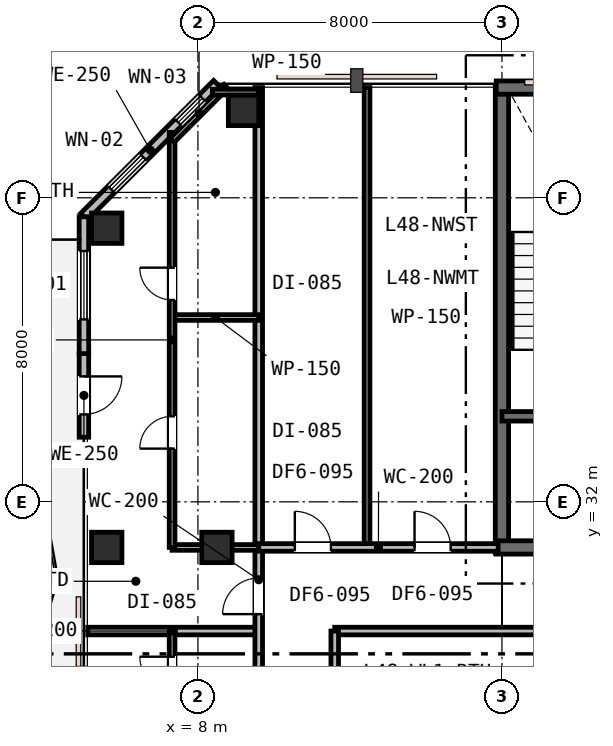
"""IFC4 building model, lengths in metres.
Left out: names, types, materials, properties, quantities, classifications, styles, units other than length and angle.
Written with IfcOpenShell. Run it as: python <this file> out.ifc"""

import sys

from ifc_helpers import new_model, si_unit, direction, frame, frame_2d, origin, origin_2d, place, context, subcontext, project, spatial, rectangle, extrude, element, fill, save


model = new_model("IFC4")
c1 = context("Model", 3, precision=1e-05, world=origin(), true_north=direction((0.0, 1.0)))
c2 = subcontext(c1, "Body", "Model", "MODEL_VIEW")
j1 = project(units=[si_unit("LENGTHUNIT", "METRE"), si_unit("PLANEANGLEUNIT", "RADIAN")], contexts=[c1])
p1 = place(None, origin())
s1 = spatial("IfcSite", under=j1, at=p1, CompositionType="ELEMENT")
p2 = place(p1, origin())
s2 = spatial("IfcBuilding", under=s1, at=p2, CompositionType="ELEMENT")
p3 = place(p2, frame((0.0, 0.0, 186.6)))
s3 = spatial("IfcBuildingStorey", under=s2, at=p3, CompositionType="ELEMENT", Elevation=186.6)
p4 = place(p3, frame((16.0, 30.65, 0.0), z_axis=(0.0, 0.0, 1.0), x_axis=(0.0, 1.0, 0.0)))
e1 = element("IfcWall", 1, at=p4, inside=s3, PredefinedType="SHEAR", context=c2, shape_type="SweptSolid", body=[
    extrude(rectangle(XDim=12.3, YDim=0.35, at=frame_2d((6.15, 0.0))), origin(), (0.0, 0.0, 1.0), 3.6),
])
p5 = place(p3, frame((15.85, 42.9, 0.0), z_axis=(0.0, 0.0, 1.0), x_axis=(1.0, 0.0, 0.0)))
e2 = element("IfcWall", 2, at=p5, inside=s3, PredefinedType="SHEAR", context=c2, shape_type="SweptSolid", body=[
    extrude(rectangle(XDim=24.3, YDim=0.35, at=frame_2d((12.15, 0.0))), origin(), (0.0, 0.0, 1.0), 3.6),
])
p6 = place(p3, frame((15.85, 30.8, 0.0), z_axis=(0.0, 0.0, 1.0), x_axis=(1.0, 0.0, 0.0)))
e3 = element("IfcWall", 3, at=p6, inside=s3, PredefinedType="SHEAR", context=c2, shape_type="SweptSolid", body=[
    extrude(rectangle(XDim=11.2, YDim=0.35, at=frame_2d((5.6, 0.0))), origin(), (0.0, 0.0, 1.0), 3.6),
])
p7 = place(p6, frame((2.45, 0.0, 0.0)))
e4 = element("IfcOpeningElement", 4, at=p7, cuts=e3, PredefinedType="OPENING", context=c2, shape_type="SweptSolid", body=[
    extrude(rectangle(XDim=1.1, YDim=2.15, at=frame_2d((0.55, 1.075))), frame((0.0, 0.185, 0.0), z_axis=(0.0, -1.0, 0.0), x_axis=(1.0, 0.0, 0.0)), (0.0, 0.0, 1.0), 0.37),
])
p8 = place(p3, frame((16.0, 34.25, 0.0), z_axis=(0.0, 0.0, 1.0), x_axis=(1.0, 0.0, 0.0)))
e5 = element("IfcWall", 5, at=p8, inside=s3, PredefinedType="SHEAR", context=c2, shape_type="SweptSolid", body=[
    extrude(rectangle(XDim=6.05, YDim=0.25, at=frame_2d((3.025, 0.0))), origin(), (0.0, 0.0, 1.0), 3.6),
])
p9 = place(p8, frame((1.25, 0.0, 0.0)))
e6 = element("IfcOpeningElement", 6, at=p9, cuts=e5, PredefinedType="OPENING", context=c2, shape_type="SweptSolid", body=[
    extrude(rectangle(XDim=1.0, YDim=2.15, at=frame_2d((0.5, 1.075))), frame((0.0, 0.135, 0.0), z_axis=(0.0, -1.0, 0.0), x_axis=(1.0, 0.0, 0.0)), (0.0, 0.0, 1.0), 0.27),
])
p10 = place(p8, frame((4.2, 0.0, 0.0)))
e7 = element("IfcOpeningElement", 7, at=p10, cuts=e5, PredefinedType="OPENING", context=c2, shape_type="SweptSolid", body=[
    extrude(rectangle(XDim=1.1, YDim=2.15, at=frame_2d((0.55, 1.075))), frame((0.0, 0.135, 0.0), z_axis=(0.0, -1.0, 0.0), x_axis=(1.0, 0.0, 0.0)), (0.0, 0.0, 1.0), 0.27),
])
for number, where, z_axis, x_axis in (
    (8, (5.6, 30.8, 0.0), (0.0, 0.0, 1.0), (1.0, 0.0, 0.0)),
    (9, (5.6, 39.2, 0.0), (0.0, 0.0, 1.0), (1.0, 0.0, 0.0)),
    (10, (8.5, 30.8, 0.0), (0.0, 0.0, 1.0), (1.0, 0.0, 0.0)),
    (11, (9.2, 42.3, 0.0), (0.0, 0.0, 1.0), (1.0, 0.0, 0.0)),
):
    element("IfcColumn", number, at=place(p3, frame(where, z_axis=z_axis, x_axis=x_axis)), inside=s3, PredefinedType="COLUMN", context=c2, shape_type="SweptSolid", body=[
        extrude(rectangle(XDim=0.8, YDim=0.8, at=origin_2d()), origin(), (0.0, 0.0, 1.0), 3.6),
    ])
p11 = place(p3, frame((8.5, 43.0, 0.0), z_axis=(0.0, 0.0, 1.0), x_axis=(-0.707106781187, -0.707106781187, 0.0)))
e12 = element("IfcWall", 12, at=p11, inside=s3, PredefinedType="STANDARD", context=c2, shape_type="SweptSolid", body=[
    extrude(rectangle(XDim=4.95, YDim=0.25, at=frame_2d((2.475, 0.0))), origin(), (0.0, 0.0, 1.0), 3.33),
])
p12 = place(p11, frame((0.54, 0.0, 0.9)))
e13 = element("IfcOpeningElement", 13, at=p12, cuts=e12, PredefinedType="OPENING", context=c2, shape_type="SweptSolid", body=[
    extrude(rectangle(XDim=0.9, YDim=1.55, at=frame_2d((0.45, 0.775))), frame((0.0, 0.135, 0.0), z_axis=(0.0, -1.0, 0.0), x_axis=(1.0, 0.0, 0.0)), (0.0, 0.0, 1.0), 0.27),
])
p13 = place(p11, frame((2.735, 0.0, 0.85)))
e14 = element("IfcOpeningElement", 14, at=p13, cuts=e12, PredefinedType="OPENING", context=c2, shape_type="SweptSolid", body=[
    extrude(rectangle(XDim=1.2, YDim=1.6, at=frame_2d((0.6, 0.8))), frame((0.0, 0.135, 0.0), z_axis=(0.0, -1.0, 0.0), x_axis=(1.0, 0.0, 0.0)), (0.0, 0.0, 1.0), 0.27),
])
p14 = place(p3, frame((5.0, 35.9, 0.0), z_axis=(0.0, 0.0, 1.0), x_axis=(0.0, -1.0, 0.0)))
e15 = element("IfcWall", 15, at=p14, inside=s3, PredefinedType="STANDARD", context=c2, shape_type="SweptSolid", body=[
    extrude(rectangle(XDim=2.2, YDim=0.25, at=frame_2d((1.1, 0.0))), origin(), (0.0, 0.0, 1.0), 3.33),
])
p15 = place(p14, frame((0.6, 0.0, 0.0)))
e16 = element("IfcOpeningElement", 16, at=p15, cuts=e15, PredefinedType="OPENING", context=c2, shape_type="SweptSolid", body=[
    extrude(rectangle(XDim=1.0, YDim=2.15, at=frame_2d((0.5, 1.075))), frame((0.0, 0.135, 0.0), z_axis=(0.0, -1.0, 0.0), x_axis=(1.0, 0.0, 0.0)), (0.0, 0.0, 1.0), 0.27),
])
p16 = place(p3, frame((5.0, 39.5, 0.0), z_axis=(0.0, 0.0, 1.0), x_axis=(0.0, -1.0, 0.0)))
e17 = element("IfcWall", 17, at=p16, inside=s3, PredefinedType="STANDARD", context=c2, shape_type="SweptSolid", body=[
    extrude(rectangle(XDim=3.6, YDim=0.25, at=frame_2d((1.8, 0.0))), origin(), (0.0, 0.0, 1.0), 3.33),
])
p17 = place(p16, frame((0.9, 0.0, 0.75)))
e18 = element("IfcOpeningElement", 18, at=p17, cuts=e17, PredefinedType="OPENING", context=c2, shape_type="SweptSolid", body=[
    extrude(rectangle(XDim=1.8, YDim=1.85, at=frame_2d((0.9, 0.925))), frame((0.0, 0.135, 0.0), z_axis=(0.0, -1.0, 0.0), x_axis=(1.0, 0.0, 0.0)), (0.0, 0.0, 1.0), 0.27),
])
p18 = place(p3, frame((5.1, 28.6, 0.0), z_axis=(0.0, 0.0, 1.0), x_axis=(1.0, 0.0, 0.0)))
e19 = element("IfcWall", 19, at=p18, inside=s3, PredefinedType="PARTITIONING", context=c2, shape_type="SweptSolid", body=[
    extrude(rectangle(XDim=4.5, YDim=0.2, at=frame_2d((2.25, 0.0))), origin(), (0.0, 0.0, 1.0), 2.92),
])
p19 = place(p3, frame((11.6, 28.6, 0.0), z_axis=(0.0, 0.0, 1.0), x_axis=(1.0, 0.0, 0.0)))
e20 = element("IfcWall", 20, at=p19, inside=s3, PredefinedType="PARTITIONING", context=c2, shape_type="SweptSolid", body=[
    extrude(rectangle(XDim=39.3, YDim=0.2, at=frame_2d((19.65, 0.0))), origin(), (0.0, 0.0, 1.0), 2.92),
])
p20 = place(p19, frame((15.825, 0.0, 0.0)))
e21 = element("IfcOpeningElement", 21, at=p20, cuts=e20, PredefinedType="OPENING", context=c2, shape_type="SweptSolid", body=[
    extrude(rectangle(XDim=0.95, YDim=2.15, at=frame_2d((0.475, 1.075))), frame((0.0, 0.11, 0.0), z_axis=(0.0, -1.0, 0.0), x_axis=(1.0, 0.0, 0.0)), (0.0, 0.0, 1.0), 0.22),
])
p21 = place(p19, frame((29.275, 0.0, 0.0)))
e22 = element("IfcOpeningElement", 22, at=p21, cuts=e20, PredefinedType="OPENING", context=c2, shape_type="SweptSolid", body=[
    extrude(rectangle(XDim=0.95, YDim=2.15, at=frame_2d((0.475, 1.075))), frame((0.0, 0.11, 0.0), z_axis=(0.0, -1.0, 0.0), x_axis=(1.0, 0.0, 0.0)), (0.0, 0.0, 1.0), 0.22),
])
p22 = place(p3, frame((9.6, 17.0, 0.0), z_axis=(0.0, 0.0, 1.0), x_axis=(0.0, 1.0, 0.0)))
e23 = element("IfcWall", 23, at=p22, inside=s3, PredefinedType="PARTITIONING", context=c2, shape_type="SweptSolid", body=[
    extrude(rectangle(XDim=25.9, YDim=0.2, at=frame_2d((12.95, 0.0))), origin(), (0.0, 0.0, 1.0), 2.92),
])
p23 = place(p22, frame((12.045, 0.0, 0.0)))
e24 = element("IfcOpeningElement", 24, at=p23, cuts=e23, PredefinedType="OPENING", context=c2, shape_type="SweptSolid", body=[
    extrude(rectangle(XDim=0.95, YDim=2.15, at=frame_2d((0.475, 1.075))), frame((0.0, 0.11, 0.0), z_axis=(0.0, -1.0, 0.0), x_axis=(1.0, 0.0, 0.0)), (0.0, 0.0, 1.0), 0.22),
])
p24 = place(p22, frame((3.125, 0.0, 0.0)))
e25 = element("IfcOpeningElement", 25, at=p24, cuts=e23, PredefinedType="OPENING", context=c2, shape_type="SweptSolid", body=[
    extrude(rectangle(XDim=0.95, YDim=2.15, at=frame_2d((0.475, 1.075))), frame((0.0, 0.11, 0.0), z_axis=(0.0, -1.0, 0.0), x_axis=(1.0, 0.0, 0.0)), (0.0, 0.0, 1.0), 0.22),
])
p25 = place(p3, frame((7.32, 30.8, 0.0), z_axis=(0.0, 0.0, 1.0), x_axis=(1.0, 0.0, 0.0)))
e26 = element("IfcWall", 26, at=p25, inside=s3, PredefinedType="PARTITIONING", context=c2, shape_type="SweptSolid", body=[
    extrude(rectangle(XDim=2.28, YDim=0.15, at=frame_2d((1.14, 0.0))), origin(), (0.0, 0.0, 1.0), 2.92),
])
p26 = place(p3, frame((7.32, 36.85, 0.0), z_axis=(0.0, 0.0, 1.0), x_axis=(1.0, 0.0, 0.0)))
e27 = element("IfcWall", 27, at=p26, inside=s3, PredefinedType="PARTITIONING", context=c2, shape_type="SweptSolid", body=[
    extrude(rectangle(XDim=2.28, YDim=0.15, at=frame_2d((1.14, 0.0))), origin(), (0.0, 0.0, 1.0), 3.33),
])
p27 = place(p3, frame((7.32, 30.8, 0.0), z_axis=(0.0, 0.0, 1.0), x_axis=(0.0, 1.0, 0.0)))
e28 = element("IfcWall", 28, at=p27, inside=s3, PredefinedType="PARTITIONING", context=c2, shape_type="SweptSolid", body=[
    extrude(rectangle(XDim=10.92, YDim=0.15, at=frame_2d((5.46, 0.0))), origin(), (0.0, 0.0, 1.0), 2.92),
])
p28 = place(p27, frame((2.6, 0.0, 0.0)))
e29 = element("IfcOpeningElement", 29, at=p28, cuts=e28, PredefinedType="OPENING", context=c2, shape_type="SweptSolid", body=[
    extrude(rectangle(XDim=0.85, YDim=2.15, at=frame_2d((0.425, 1.075))), frame((0.0, 0.085, 0.0), z_axis=(0.0, -1.0, 0.0), x_axis=(1.0, 0.0, 0.0)), (0.0, 0.0, 1.0), 0.17),
])
p29 = place(p27, frame((6.512, 0.0, 0.0)))
e30 = element("IfcOpeningElement", 30, at=p29, cuts=e28, PredefinedType="OPENING", context=c2, shape_type="SweptSolid", body=[
    extrude(rectangle(XDim=0.85, YDim=2.15, at=frame_2d((0.425, 1.075))), frame((0.0, 0.085, 0.0), z_axis=(0.0, -1.0, 0.0), x_axis=(1.0, 0.0, 0.0)), (0.0, 0.0, 1.0), 0.17),
])
p30 = place(p3, frame((7.32, 41.509, 0.0), z_axis=(0.0, 0.0, 1.0), x_axis=(0.707106781187, 0.707106781187, 0.0)))
e31 = element("IfcWall", 31, at=p30, inside=s3, PredefinedType="PARTITIONING", context=c2, shape_type="SweptSolid", body=[
    extrude(rectangle(XDim=2.009, YDim=0.15, at=frame_2d((1.004, 0.0))), origin(), (0.0, 0.0, 1.0), 3.33),
])
p31 = place(p3, frame((8.38, 42.78, 0.0), z_axis=(0.0, 0.0, 1.0), x_axis=(1.0, 0.0, 0.0)))
e32 = element("IfcWall", 32, at=p31, inside=s3, PredefinedType="PARTITIONING", context=c2, shape_type="SweptSolid", body=[
    extrude(rectangle(XDim=1.22, YDim=0.15, at=frame_2d((0.61, 0.0))), origin(), (0.0, 0.0, 1.0), 3.02),
])
p32 = place(p3, frame((12.45, 30.8, 0.0), z_axis=(0.0, 0.0, 1.0), x_axis=(0.0, 1.0, 0.0)))
e33 = element("IfcWall", 33, at=p32, inside=s3, PredefinedType="PARTITIONING", context=c2, shape_type="SweptSolid", body=[
    extrude(rectangle(XDim=12.1, YDim=0.15, at=frame_2d((6.05, 0.0))), origin(), (0.0, 0.0, 1.0), 2.92),
])
p33 = place(p3, frame((9.6, 30.8, 0.0), z_axis=(0.0, 0.0, 1.0), x_axis=(1.0, 0.0, 0.0)))
e34 = element("IfcWall", 34, at=p33, inside=s3, PredefinedType="PARTITIONING", context=c2, shape_type="SweptSolid", body=[
    extrude(rectangle(XDim=6.3, YDim=0.2, at=frame_2d((3.15, 0.0))), origin(), (0.0, 0.0, 1.0), 2.92),
])
p34 = place(p33, frame((0.95, 0.0, 0.0)))
e35 = element("IfcOpeningElement", 35, at=p34, cuts=e34, PredefinedType="OPENING", context=c2, shape_type="SweptSolid", body=[
    extrude(rectangle(XDim=0.95, YDim=2.15, at=frame_2d((0.475, 1.075))), frame((0.0, 0.11, 0.0), z_axis=(0.0, -1.0, 0.0), x_axis=(1.0, 0.0, 0.0)), (0.0, 0.0, 1.0), 0.22),
])
p35 = place(p33, frame((4.1, 0.0, 0.0)))
e36 = element("IfcOpeningElement", 36, at=p35, cuts=e34, PredefinedType="OPENING", context=c2, shape_type="SweptSolid", body=[
    extrude(rectangle(XDim=0.95, YDim=2.15, at=frame_2d((0.475, 1.075))), frame((0.0, 0.11, 0.0), z_axis=(0.0, -1.0, 0.0), x_axis=(1.0, 0.0, 0.0)), (0.0, 0.0, 1.0), 0.22),
])
p36 = place(p3, frame((7.32, 24.2, 0.0), z_axis=(0.0, 0.0, 1.0), x_axis=(0.0, 1.0, 0.0)))
e37 = element("IfcWall", 37, at=p36, inside=s3, PredefinedType="PARTITIONING", context=c2, shape_type="SweptSolid", body=[
    extrude(rectangle(XDim=4.4, YDim=0.15, at=frame_2d((2.2, 0.0))), origin(), (0.0, 0.0, 1.0), 2.92),
])
p37 = place(p36, frame((0.873, 0.0, 0.0)))
e38 = element("IfcOpeningElement", 38, at=p37, cuts=e37, PredefinedType="OPENING", context=c2, shape_type="SweptSolid", body=[
    extrude(rectangle(XDim=0.85, YDim=2.15, at=frame_2d((0.425, 1.075))), frame((0.0, 0.085, 0.0), z_axis=(0.0, -1.0, 0.0), x_axis=(1.0, 0.0, 0.0)), (0.0, 0.0, 1.0), 0.17),
])
p38 = place(p36, frame((2.875, 0.0, 0.0)))
e39 = element("IfcOpeningElement", 39, at=p38, cuts=e37, PredefinedType="OPENING", context=c2, shape_type="SweptSolid", body=[
    extrude(rectangle(XDim=0.85, YDim=2.15, at=frame_2d((0.425, 1.075))), frame((0.0, 0.085, 0.0), z_axis=(0.0, -1.0, 0.0), x_axis=(1.0, 0.0, 0.0)), (0.0, 0.0, 1.0), 0.17),
])
p39 = place(p3, frame((11.6, 17.0, 0.0), z_axis=(0.0, 0.0, 1.0), x_axis=(0.0, 1.0, 0.0)))
e40 = element("IfcWall", 40, at=p39, inside=s3, PredefinedType="PARTITIONING", context=c2, shape_type="SweptSolid", body=[
    extrude(rectangle(XDim=11.6, YDim=0.2, at=frame_2d((5.8, 0.0))), origin(), (0.0, 0.0, 1.0), 2.92),
])
p40 = place(p39, frame((8.225, 0.0, 0.0)))
e41 = element("IfcOpeningElement", 41, at=p40, cuts=e40, PredefinedType="OPENING", context=c2, shape_type="SweptSolid", body=[
    extrude(rectangle(XDim=0.95, YDim=2.15, at=frame_2d((0.475, 1.075))), frame((0.0, 0.11, 0.0), z_axis=(0.0, -1.0, 0.0), x_axis=(1.0, 0.0, 0.0)), (0.0, 0.0, 1.0), 0.22),
])
p41 = place(p39, frame((2.425, 0.0, 0.0)))
e42 = element("IfcOpeningElement", 42, at=p41, cuts=e40, PredefinedType="OPENING", context=c2, shape_type="SweptSolid", body=[
    extrude(rectangle(XDim=0.95, YDim=2.15, at=frame_2d((0.475, 1.075))), frame((0.0, 0.11, 0.0), z_axis=(0.0, -1.0, 0.0), x_axis=(1.0, 0.0, 0.0)), (0.0, 0.0, 1.0), 0.22),
])
p42 = place(p12, origin())
e43 = element("IfcWindow", 43, at=p42, inside=s3, PartitioningType="SINGLE_PANEL", PredefinedType="WINDOW", context=c2, shape_type="SweptSolid", body=[
    extrude(rectangle(XDim=0.9, YDim=1.55, at=frame_2d((0.45, 0.775))), frame((0.0, 0.03, 0.0), z_axis=(0.0, -1.0, 0.0), x_axis=(1.0, 0.0, 0.0)), (0.0, 0.0, 1.0), 0.06),
])
fill(e13, e43)
p43 = place(p13, origin())
e44 = element("IfcWindow", 44, at=p43, inside=s3, PartitioningType="SINGLE_PANEL", PredefinedType="WINDOW", context=c2, shape_type="SweptSolid", body=[
    extrude(rectangle(XDim=1.2, YDim=1.6, at=frame_2d((0.6, 0.8))), frame((0.0, 0.03, 0.0), z_axis=(0.0, -1.0, 0.0), x_axis=(1.0, 0.0, 0.0)), (0.0, 0.0, 1.0), 0.06),
])
fill(e14, e44)
p44 = place(p15, origin())
e45 = element("IfcDoor", 45, at=p44, inside=s3, OperationType="SINGLE_SWING_LEFT", PredefinedType="DOOR", context=c2, shape_type="SweptSolid", body=[
    extrude(rectangle(XDim=1.0, YDim=2.15, at=frame_2d((0.5, 1.075))), frame((0.0, 0.025, 0.0), z_axis=(0.0, -1.0, 0.0), x_axis=(1.0, 0.0, 0.0)), (0.0, 0.0, 1.0), 0.05),
])
fill(e16, e45)
p45 = place(p17, origin())
e46 = element("IfcWindow", 46, at=p45, inside=s3, PartitioningType="SINGLE_PANEL", PredefinedType="WINDOW", context=c2, shape_type="SweptSolid", body=[
    extrude(rectangle(XDim=1.8, YDim=1.85, at=frame_2d((0.9, 0.925))), frame((0.0, 0.03, 0.0), z_axis=(0.0, -1.0, 0.0), x_axis=(1.0, 0.0, 0.0)), (0.0, 0.0, 1.0), 0.06),
])
fill(e18, e46)
p46 = place(p23, origin())
e47 = element("IfcDoor", 47, at=p46, inside=s3, OperationType="SINGLE_SWING_LEFT", PredefinedType="DOOR", context=c2, shape_type="SweptSolid", body=[
    extrude(rectangle(XDim=0.95, YDim=2.15, at=frame_2d((0.475, 1.075))), frame((0.0, 0.025, 0.0), z_axis=(0.0, -1.0, 0.0), x_axis=(1.0, 0.0, 0.0)), (0.0, 0.0, 1.0), 0.05),
])
fill(e24, e47)
p47 = place(p28, origin())
e48 = element("IfcDoor", 48, at=p47, inside=s3, OperationType="SINGLE_SWING_LEFT", PredefinedType="DOOR", context=c2, shape_type="SweptSolid", body=[
    extrude(rectangle(XDim=0.85, YDim=2.15, at=frame_2d((0.425, 1.075))), frame((0.0, 0.025, 0.0), z_axis=(0.0, -1.0, 0.0), x_axis=(1.0, 0.0, 0.0)), (0.0, 0.0, 1.0), 0.05),
])
fill(e29, e48)
p48 = place(p29, origin())
e49 = element("IfcDoor", 49, at=p48, inside=s3, OperationType="SINGLE_SWING_RIGHT", PredefinedType="DOOR", context=c2, shape_type="SweptSolid", body=[
    extrude(rectangle(XDim=0.85, YDim=2.15, at=frame_2d((0.425, 1.075))), frame((0.0, 0.025, 0.0), z_axis=(0.0, -1.0, 0.0), x_axis=(1.0, 0.0, 0.0)), (0.0, 0.0, 1.0), 0.05),
])
fill(e30, e49)
p49 = place(p34, origin())
e50 = element("IfcDoor", 50, at=p49, inside=s3, OperationType="SINGLE_SWING_LEFT", PredefinedType="DOOR", context=c2, shape_type="SweptSolid", body=[
    extrude(rectangle(XDim=0.95, YDim=2.15, at=frame_2d((0.475, 1.075))), frame((0.0, 0.025, 0.0), z_axis=(0.0, -1.0, 0.0), x_axis=(1.0, 0.0, 0.0)), (0.0, 0.0, 1.0), 0.05),
])
fill(e35, e50)
p50 = place(p35, origin())
e51 = element("IfcDoor", 51, at=p50, inside=s3, OperationType="SINGLE_SWING_LEFT", PredefinedType="DOOR", context=c2, shape_type="SweptSolid", body=[
    extrude(rectangle(XDim=0.95, YDim=2.15, at=frame_2d((0.475, 1.075))), frame((0.0, 0.025, 0.0), z_axis=(0.0, -1.0, 0.0), x_axis=(1.0, 0.0, 0.0)), (0.0, 0.0, 1.0), 0.05),
])
fill(e36, e51)
p51 = place(p38, origin())
e52 = element("IfcDoor", 52, at=p51, inside=s3, OperationType="SINGLE_SWING_RIGHT", PredefinedType="DOOR", context=c2, shape_type="SweptSolid", body=[
    extrude(rectangle(XDim=0.85, YDim=2.15, at=frame_2d((0.425, 1.075))), frame((0.0, 0.025, 0.0), z_axis=(0.0, -1.0, 0.0), x_axis=(1.0, 0.0, 0.0)), (0.0, 0.0, 1.0), 0.05),
])
fill(e39, e52)
save(model, sys.argv[1])
